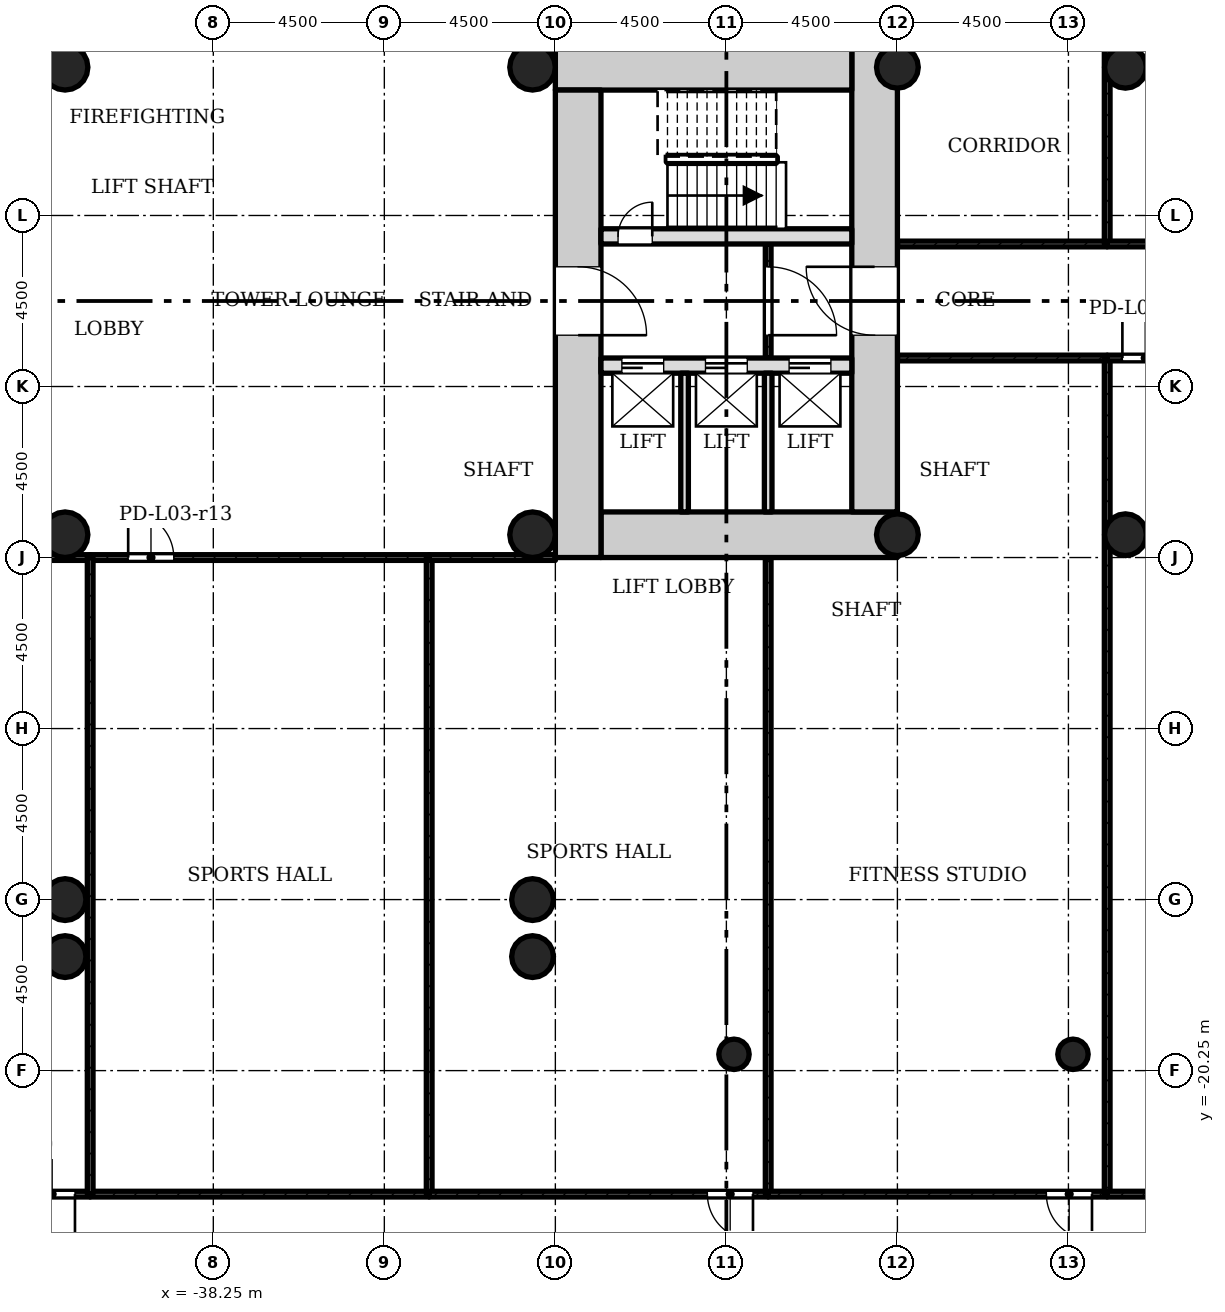
"""IFC4 building model, lengths in metres.
Left out: names, types, materials, properties, quantities, classifications, styles, units other than length and angle.
Written with IfcOpenShell. Run it as: python <this file> out.ifc"""

import sys

from ifc_helpers import new_model, si_unit, direction, frame, frame_2d, origin, origin_2d, place, context, subcontext, project, spatial, rectangle, hollow_circle, extrude, element, fill, save


model = new_model("IFC4")
c1 = context("Model", 3, precision=1e-05, world=origin(), true_north=direction((0.0, 1.0)))
c2 = subcontext(c1, "Body", "Model", "MODEL_VIEW")
j1 = project(units=[si_unit("LENGTHUNIT", "METRE"), si_unit("PLANEANGLEUNIT", "RADIAN")], contexts=[c1])
p1 = place(None, origin())
s1 = spatial("IfcSite", under=j1, at=p1, CompositionType="ELEMENT")
p2 = place(p1, origin())
s2 = spatial("IfcBuilding", under=s1, at=p2, CompositionType="ELEMENT")
p3 = place(p2, frame((0.0, 0.0, 15.5)))
s3 = spatial("IfcBuildingStorey", under=s2, at=p3, CompositionType="ELEMENT", Elevation=15.5)
p4 = place(p3, frame((-28.05, -6.15, 0.0), z_axis=(0.0, 0.0, 1.0), x_axis=(1.0, 0.0, 0.0)))
e1 = element("IfcWall", 1, at=p4, inside=s3, PredefinedType="SHEAR", context=c2, shape_type="SweptSolid", body=[
    extrude(rectangle(XDim=7.8, YDim=1.2, at=frame_2d((3.9, 0.0))), origin(), (0.0, 0.0, 1.0), 4.5),
])
p5 = place(p3, frame((-20.85, -5.55, 0.0), z_axis=(0.0, 0.0, 1.0), x_axis=(0.0, 1.0, 0.0)))
e2 = element("IfcWall", 2, at=p5, inside=s3, PredefinedType="SHEAR", context=c2, shape_type="SweptSolid", body=[
    extrude(rectangle(XDim=12.3, YDim=1.2, at=frame_2d((6.15, 0.0))), origin(), (0.0, 0.0, 1.0), 4.5),
])
p6 = place(p5, frame((4.65, 0.0, 0.0)))
e3 = element("IfcOpeningElement", 3, at=p6, cuts=e2, PredefinedType="OPENING", context=c2, shape_type="SweptSolid", body=[
    extrude(rectangle(XDim=1.8, YDim=2.1, at=frame_2d((0.9, 1.05))), frame((0.0, 0.61, 0.0), z_axis=(0.0, -1.0, 0.0), x_axis=(1.0, 0.0, 0.0)), (0.0, 0.0, 1.0), 1.22),
])
p7 = place(p3, frame((-21.45, 6.15, 0.0), z_axis=(0.0, 0.0, 1.0), x_axis=(-1.0, 0.0, 0.0)))
e4 = element("IfcWall", 4, at=p7, inside=s3, PredefinedType="SHEAR", context=c2, shape_type="SweptSolid", body=[
    extrude(rectangle(XDim=7.8, YDim=1.2, at=frame_2d((3.9, 0.0))), origin(), (0.0, 0.0, 1.0), 4.5),
])
p8 = place(p3, frame((-28.65, 5.55, 0.0), z_axis=(0.0, 0.0, 1.0), x_axis=(0.0, -1.0, 0.0)))
e5 = element("IfcWall", 5, at=p8, inside=s3, PredefinedType="SHEAR", context=c2, shape_type="SweptSolid", body=[
    extrude(rectangle(XDim=12.3, YDim=1.2, at=frame_2d((6.15, 0.0))), origin(), (0.0, 0.0, 1.0), 4.5),
])
p9 = place(p8, frame((4.65, 0.0, 0.0)))
e6 = element("IfcOpeningElement", 6, at=p9, cuts=e5, PredefinedType="OPENING", context=c2, shape_type="SweptSolid", body=[
    extrude(rectangle(XDim=1.8, YDim=2.1, at=frame_2d((0.9, 1.05))), frame((0.0, 0.61, 0.0), z_axis=(0.0, -1.0, 0.0), x_axis=(1.0, 0.0, 0.0)), (0.0, 0.0, 1.0), 1.22),
])
p10 = place(p3, frame((-28.05, -1.7, 0.0), z_axis=(0.0, 0.0, 1.0), x_axis=(1.0, 0.0, 0.0)))
e7 = element("IfcWall", 7, at=p10, inside=s3, PredefinedType="SHEAR", context=c2, shape_type="SweptSolid", body=[
    extrude(rectangle(XDim=6.6, YDim=0.4, at=frame_2d((3.3, 0.0))), origin(), (0.0, 0.0, 1.0), 4.5),
])
p11 = place(p10, frame((0.55, 0.0, 0.0)))
e8 = element("IfcOpeningElement", 8, at=p11, cuts=e7, PredefinedType="OPENING", context=c2, shape_type="SweptSolid", body=[
    extrude(rectangle(XDim=1.1, YDim=2.1, at=frame_2d((0.55, 1.05))), frame((0.0, 0.21, 0.0), z_axis=(0.0, -1.0, 0.0), x_axis=(1.0, 0.0, 0.0)), (0.0, 0.0, 1.0), 0.42),
])
p12 = place(p10, frame((2.75, 0.0, 0.0)))
e9 = element("IfcOpeningElement", 9, at=p12, cuts=e7, PredefinedType="OPENING", context=c2, shape_type="SweptSolid", body=[
    extrude(rectangle(XDim=1.1, YDim=2.1, at=frame_2d((0.55, 1.05))), frame((0.0, 0.21, 0.0), z_axis=(0.0, -1.0, 0.0), x_axis=(1.0, 0.0, 0.0)), (0.0, 0.0, 1.0), 0.42),
])
p13 = place(p10, frame((4.95, 0.0, 0.0)))
e10 = element("IfcOpeningElement", 10, at=p13, cuts=e7, PredefinedType="OPENING", context=c2, shape_type="SweptSolid", body=[
    extrude(rectangle(XDim=1.1, YDim=2.1, at=frame_2d((0.55, 1.05))), frame((0.0, 0.21, 0.0), z_axis=(0.0, -1.0, 0.0), x_axis=(1.0, 0.0, 0.0)), (0.0, 0.0, 1.0), 0.42),
])
p14 = place(p3, frame((-28.05, 1.7, 0.0), z_axis=(0.0, 0.0, 1.0), x_axis=(1.0, 0.0, 0.0)))
e11 = element("IfcWall", 11, at=p14, inside=s3, PredefinedType="SHEAR", context=c2, shape_type="SweptSolid", body=[
    extrude(rectangle(XDim=6.6, YDim=0.4, at=frame_2d((3.3, 0.0))), origin(), (0.0, 0.0, 1.0), 4.5),
])
p15 = place(p14, frame((0.45, 0.0, 0.0)))
e12 = element("IfcOpeningElement", 12, at=p15, cuts=e11, PredefinedType="OPENING", context=c2, shape_type="SweptSolid", body=[
    extrude(rectangle(XDim=0.9, YDim=2.1, at=frame_2d((0.45, 1.05))), frame((0.0, 0.21, 0.0), z_axis=(0.0, -1.0, 0.0), x_axis=(1.0, 0.0, 0.0)), (0.0, 0.0, 1.0), 0.42),
])
for number, where, z_axis, x_axis in (
    (13, (-20.25, -6.15, 0.0), (0.0, 0.0, 1.0), (1.0, 0.0, 0.0)),
    (14, (-20.25, 6.15, 0.0), (0.0, 0.0, 1.0), (1.0, 0.0, 0.0)),
    (15, (-14.25, -6.15, 0.0), (0.0, 0.0, 1.0), (1.0, 0.0, 0.0)),
    (16, (-14.25, 6.15, 0.0), (0.0, 0.0, 1.0), (1.0, 0.0, 0.0)),
    (17, (-42.15, -15.75, 0.0), (0.0, 0.0, 1.0), (1.0, 0.0, 0.0)),
    (18, (-29.85, -15.75, 0.0), (0.0, 0.0, 1.0), (1.0, 0.0, 0.0)),
    (19, (-42.15, -17.25, 0.0), (0.0, 0.0, 1.0), (1.0, 0.0, 0.0)),
    (20, (-29.85, -17.25, 0.0), (0.0, 0.0, 1.0), (1.0, 0.0, 0.0)),
):
    element("IfcColumn", number, at=place(p3, frame(where, z_axis=z_axis, x_axis=x_axis)), inside=s3, PredefinedType="COLUMN", context=c2, shape_type="SweptSolid", body=[
        extrude(hollow_circle(Radius=0.55, WallThickness=0.04, at=origin_2d()), origin(), (0.0, 0.0, 1.0), 4.5),
    ])
for number, where, z_axis, x_axis in (
    (21, (-42.15, -6.15, 0.0), (0.0, 0.0, 1.0), (1.0, 0.0, 0.0)),
    (22, (-29.85, -6.15, 0.0), (0.0, 0.0, 1.0), (1.0, 0.0, 0.0)),
    (23, (-29.85, 6.15, 0.0), (0.0, 0.0, 1.0), (1.0, 0.0, 0.0)),
    (24, (-42.15, 6.15, 0.0), (0.0, 0.0, 1.0), (1.0, 0.0, 0.0)),
):
    element("IfcColumn", number, at=place(p3, frame(where, z_axis=z_axis, x_axis=x_axis)), inside=s3, PredefinedType="COLUMN", context=c2, shape_type="SweptSolid", body=[
        extrude(hollow_circle(Radius=0.6, WallThickness=0.045, at=origin_2d()), origin(), (0.0, 0.0, 1.0), 4.5),
    ])
for number, where, z_axis, x_axis in (
    (25, (-24.55, -19.821, 0.0), (0.0, 0.0, 1.0), (1.0, 0.0, 0.0)),
    (26, (-15.63, -19.821, 0.0), (0.0, 0.0, 1.0), (1.0, 0.0, 0.0)),
):
    element("IfcColumn", number, at=place(p3, frame(where, z_axis=z_axis, x_axis=x_axis)), inside=s3, PredefinedType="COLUMN", context=c2, shape_type="SweptSolid", body=[
        extrude(hollow_circle(Radius=0.4, WallThickness=0.028, at=origin_2d()), origin(), (0.0, 0.0, 1.0), 4.5),
    ])
p16 = place(p3, frame((-23.65, -1.5, 0.0), z_axis=(0.0, 0.0, 1.0), x_axis=(0.0, 1.0, 0.0)))
e27 = element("IfcWall", 27, at=p16, inside=s3, PredefinedType="PARTITIONING", context=c2, shape_type="SweptSolid", body=[
    extrude(rectangle(XDim=3.0, YDim=0.15, at=frame_2d((1.5, 0.0))), origin(), (0.0, 0.0, 1.0), 4.08),
])
p17 = place(p16, frame((0.6, 0.0, 0.0)))
e28 = element("IfcOpeningElement", 28, at=p17, cuts=e27, PredefinedType="OPENING", context=c2, shape_type="SweptSolid", body=[
    extrude(rectangle(XDim=1.8, YDim=2.1, at=frame_2d((0.9, 1.05))), frame((0.0, 0.085, 0.0), z_axis=(0.0, -1.0, 0.0), x_axis=(1.0, 0.0, 0.0)), (0.0, 0.0, 1.0), 0.17),
])
for number, where, z_axis, x_axis in (
    (29, (-25.85, -5.55, 0.0), (0.0, 0.0, 1.0), (0.0, 1.0, 0.0)),
    (30, (-23.65, -5.55, 0.0), (0.0, 0.0, 1.0), (0.0, 1.0, 0.0)),
):
    element("IfcWall", number, at=place(p3, frame(where, z_axis=z_axis, x_axis=x_axis)), inside=s3, PredefinedType="SOLIDWALL", context=c2, shape_type="SweptSolid", body=[
        extrude(rectangle(XDim=3.65, YDim=0.2, at=frame_2d((1.825, 0.0))), origin(), (0.0, 0.0, 1.0), 4.08),
    ])
p18 = place(p3, frame((-42.75, -6.75, 0.0), z_axis=(0.0, 0.0, 1.0), x_axis=(1.0, 0.0, 0.0)))
e31 = element("IfcWall", 31, at=p18, inside=s3, PredefinedType="PARTITIONING", context=c2, shape_type="SweptSolid", body=[
    extrude(rectangle(XDim=1.26, YDim=0.15, at=frame_2d((0.63, 0.0))), origin(), (0.0, 0.0, 1.0), 4.08),
])
p19 = place(p3, frame((-41.49, -23.5, 0.0), z_axis=(0.0, 0.0, 1.0), x_axis=(-1.0, 0.0, 0.0)))
e32 = element("IfcWall", 32, at=p19, inside=s3, PredefinedType="PARTITIONING", context=c2, shape_type="SweptSolid", body=[
    extrude(rectangle(XDim=8.92, YDim=0.15, at=frame_2d((4.46, 0.0))), origin(), (0.0, 0.0, 1.0), 4.08),
])
p20 = place(p19, frame((0.4, 0.0, 0.0)))
e33 = element("IfcOpeningElement", 33, at=p20, cuts=e32, PredefinedType="OPENING", context=c2, shape_type="SweptSolid", body=[
    extrude(rectangle(XDim=1.2, YDim=2.1, at=frame_2d((0.6, 1.05))), frame((0.0, 0.085, 0.0), z_axis=(0.0, -1.0, 0.0), x_axis=(1.0, 0.0, 0.0)), (0.0, 0.0, 1.0), 0.17),
])
p21 = place(p3, frame((-41.49, -6.75, 0.0), z_axis=(0.0, 0.0, 1.0), x_axis=(1.0, 0.0, 0.0)))
e34 = element("IfcWall", 34, at=p21, inside=s3, PredefinedType="PARTITIONING", context=c2, shape_type="SweptSolid", body=[
    extrude(rectangle(XDim=8.92, YDim=0.15, at=frame_2d((4.46, 0.0))), origin(), (0.0, 0.0, 1.0), 4.08),
])
p22 = place(p21, frame((1.0, 0.0, 0.0)))
e35 = element("IfcOpeningElement", 35, at=p22, cuts=e34, PredefinedType="OPENING", context=c2, shape_type="SweptSolid", body=[
    extrude(rectangle(XDim=1.2, YDim=2.1, at=frame_2d((0.6, 1.05))), frame((0.0, 0.085, 0.0), z_axis=(0.0, -1.0, 0.0), x_axis=(1.0, 0.0, 0.0)), (0.0, 0.0, 1.0), 0.17),
])
p23 = place(p3, frame((-32.57, -23.5, 0.0), z_axis=(0.0, 0.0, 1.0), x_axis=(-1.0, 0.0, 0.0)))
e36 = element("IfcWall", 36, at=p23, inside=s3, PredefinedType="PARTITIONING", context=c2, shape_type="SweptSolid", body=[
    extrude(rectangle(XDim=8.92, YDim=0.15, at=frame_2d((4.46, 0.0))), origin(), (0.0, 0.0, 1.0), 4.08),
])
for number, where, z_axis, x_axis in (
    (37, (-41.49, -23.5, 0.0), (0.0, 0.0, 1.0), (0.0, 1.0, 0.0)),
    (38, (-32.57, -6.75, 0.0), (0.0, 0.0, 1.0), (0.0, -1.0, 0.0)),
):
    element("IfcWall", number, at=place(p3, frame(where, z_axis=z_axis, x_axis=x_axis)), inside=s3, PredefinedType="PARTITIONING", context=c2, shape_type="SweptSolid", body=[
        extrude(rectangle(XDim=16.75, YDim=0.15, at=frame_2d((8.375, 0.0))), origin(), (0.0, 0.0, 1.0), 4.08),
    ])
p24 = place(p3, frame((-32.57, -6.75, 0.0), z_axis=(0.0, 0.0, 1.0), x_axis=(1.0, 0.0, 0.0)))
e39 = element("IfcWall", 39, at=p24, inside=s3, PredefinedType="PARTITIONING", context=c2, shape_type="SweptSolid", body=[
    extrude(rectangle(XDim=3.32, YDim=0.15, at=frame_2d((1.66, 0.0))), origin(), (0.0, 0.0, 1.0), 4.08),
])
p25 = place(p3, frame((-23.65, -23.5, 0.0), z_axis=(0.0, 0.0, 1.0), x_axis=(-1.0, 0.0, 0.0)))
e40 = element("IfcWall", 40, at=p25, inside=s3, PredefinedType="PARTITIONING", context=c2, shape_type="SweptSolid", body=[
    extrude(rectangle(XDim=8.92, YDim=0.15, at=frame_2d((4.46, 0.0))), origin(), (0.0, 0.0, 1.0), 4.08),
])
p26 = place(p25, frame((0.4, 0.0, 0.0)))
e41 = element("IfcOpeningElement", 41, at=p26, cuts=e40, PredefinedType="OPENING", context=c2, shape_type="SweptSolid", body=[
    extrude(rectangle(XDim=1.2, YDim=2.1, at=frame_2d((0.6, 1.05))), frame((0.0, 0.085, 0.0), z_axis=(0.0, -1.0, 0.0), x_axis=(1.0, 0.0, 0.0)), (0.0, 0.0, 1.0), 0.17),
])
p27 = place(p3, frame((-23.65, -6.75, 0.0), z_axis=(0.0, 0.0, 1.0), x_axis=(0.0, -1.0, 0.0)))
e42 = element("IfcWall", 42, at=p27, inside=s3, PredefinedType="PARTITIONING", context=c2, shape_type="SweptSolid", body=[
    extrude(rectangle(XDim=16.75, YDim=0.15, at=frame_2d((8.375, 0.0))), origin(), (0.0, 0.0, 1.0), 4.08),
])
p28 = place(p3, frame((-20.25, -1.5, 0.0), z_axis=(0.0, 0.0, 1.0), x_axis=(1.0, 0.0, 0.0)))
e43 = element("IfcWall", 43, at=p28, inside=s3, PredefinedType="PARTITIONING", context=c2, shape_type="SweptSolid", body=[
    extrude(rectangle(XDim=5.52, YDim=0.15, at=frame_2d((2.76, 0.0))), origin(), (0.0, 0.0, 1.0), 4.08),
])
p29 = place(p3, frame((-14.73, -23.5, 0.0), z_axis=(0.0, 0.0, 1.0), x_axis=(-1.0, 0.0, 0.0)))
e44 = element("IfcWall", 44, at=p29, inside=s3, PredefinedType="PARTITIONING", context=c2, shape_type="SweptSolid", body=[
    extrude(rectangle(XDim=8.92, YDim=0.15, at=frame_2d((4.46, 0.0))), origin(), (0.0, 0.0, 1.0), 4.08),
])
p30 = place(p29, frame((0.4, 0.0, 0.0)))
e45 = element("IfcOpeningElement", 45, at=p30, cuts=e44, PredefinedType="OPENING", context=c2, shape_type="SweptSolid", body=[
    extrude(rectangle(XDim=1.2, YDim=2.1, at=frame_2d((0.6, 1.05))), frame((0.0, 0.085, 0.0), z_axis=(0.0, -1.0, 0.0), x_axis=(1.0, 0.0, 0.0)), (0.0, 0.0, 1.0), 0.17),
])
p31 = place(p3, frame((-14.73, -1.5, 0.0), z_axis=(0.0, 0.0, 1.0), x_axis=(0.0, -1.0, 0.0)))
e46 = element("IfcWall", 46, at=p31, inside=s3, PredefinedType="PARTITIONING", context=c2, shape_type="SweptSolid", body=[
    extrude(rectangle(XDim=22.0, YDim=0.15, at=frame_2d((11.0, 0.0))), origin(), (0.0, 0.0, 1.0), 4.08),
])
p32 = place(p3, frame((-14.73, 1.5, 0.0), z_axis=(0.0, 0.0, 1.0), x_axis=(-1.0, 0.0, 0.0)))
e47 = element("IfcWall", 47, at=p32, inside=s3, PredefinedType="PARTITIONING", context=c2, shape_type="SweptSolid", body=[
    extrude(rectangle(XDim=5.52, YDim=0.15, at=frame_2d((2.76, 0.0))), origin(), (0.0, 0.0, 1.0), 4.08),
])
p33 = place(p3, frame((-14.73, 26.5, 0.0), z_axis=(0.0, 0.0, 1.0), x_axis=(0.0, -1.0, 0.0)))
e48 = element("IfcWall", 48, at=p33, inside=s3, PredefinedType="PARTITIONING", context=c2, shape_type="SweptSolid", body=[
    extrude(rectangle(XDim=25.0, YDim=0.15, at=frame_2d((12.5, 0.0))), origin(), (0.0, 0.0, 1.0), 4.08),
])
p34 = place(p3, frame((-14.73, -1.5, 0.0), z_axis=(0.0, 0.0, 1.0), x_axis=(1.0, 0.0, 0.0)))
e49 = element("IfcWall", 49, at=p34, inside=s3, PredefinedType="PARTITIONING", context=c2, shape_type="SweptSolid", body=[
    extrude(rectangle(XDim=8.92, YDim=0.15, at=frame_2d((4.46, 0.0))), origin(), (0.0, 0.0, 1.0), 4.08),
])
p35 = place(p34, frame((0.4, 0.0, 0.0)))
e50 = element("IfcOpeningElement", 50, at=p35, cuts=e49, PredefinedType="OPENING", context=c2, shape_type="SweptSolid", body=[
    extrude(rectangle(XDim=1.2, YDim=2.1, at=frame_2d((0.6, 1.05))), frame((0.0, 0.085, 0.0), z_axis=(0.0, -1.0, 0.0), x_axis=(1.0, 0.0, 0.0)), (0.0, 0.0, 1.0), 0.17),
])
for number, where, z_axis, x_axis in (
    (51, (-5.81, -23.5, 0.0), (0.0, 0.0, 1.0), (-1.0, 0.0, 0.0)),
    (52, (-5.81, 1.5, 0.0), (0.0, 0.0, 1.0), (-1.0, 0.0, 0.0)),
):
    element("IfcWall", number, at=place(p3, frame(where, z_axis=z_axis, x_axis=x_axis)), inside=s3, PredefinedType="PARTITIONING", context=c2, shape_type="SweptSolid", body=[
        extrude(rectangle(XDim=8.92, YDim=0.15, at=frame_2d((4.46, 0.0))), origin(), (0.0, 0.0, 1.0), 4.08),
    ])
p36 = place(p17, origin())
e53 = element("IfcDoor", 53, at=p36, inside=s3, OperationType="SINGLE_SWING_LEFT", PredefinedType="DOOR", context=c2, shape_type="SweptSolid", body=[
    extrude(rectangle(XDim=1.8, YDim=2.1, at=frame_2d((0.9, 1.05))), frame((0.0, 0.025, 0.0), z_axis=(0.0, -1.0, 0.0), x_axis=(1.0, 0.0, 0.0)), (0.0, 0.0, 1.0), 0.05),
])
fill(e28, e53)
p37 = place(p20, origin())
e54 = element("IfcDoor", 54, at=p37, inside=s3, OperationType="SINGLE_SWING_RIGHT", PredefinedType="DOOR", context=c2, shape_type="SweptSolid", body=[
    extrude(rectangle(XDim=1.2, YDim=2.1, at=frame_2d((0.6, 1.05))), frame((0.0, 0.025, 0.0), z_axis=(0.0, -1.0, 0.0), x_axis=(1.0, 0.0, 0.0)), (0.0, 0.0, 1.0), 0.05),
])
fill(e33, e54)
p38 = place(p22, origin())
e55 = element("IfcDoor", 55, at=p38, inside=s3, OperationType="SINGLE_SWING_RIGHT", PredefinedType="DOOR", context=c2, shape_type="SweptSolid", body=[
    extrude(rectangle(XDim=1.2, YDim=2.1, at=frame_2d((0.6, 1.05))), frame((0.0, 0.025, 0.0), z_axis=(0.0, -1.0, 0.0), x_axis=(1.0, 0.0, 0.0)), (0.0, 0.0, 1.0), 0.05),
])
fill(e35, e55)
p39 = place(p26, origin())
e56 = element("IfcDoor", 56, at=p39, inside=s3, OperationType="SINGLE_SWING_RIGHT", PredefinedType="DOOR", context=c2, shape_type="SweptSolid", body=[
    extrude(rectangle(XDim=1.2, YDim=2.1, at=frame_2d((0.6, 1.05))), frame((0.0, 0.025, 0.0), z_axis=(0.0, -1.0, 0.0), x_axis=(1.0, 0.0, 0.0)), (0.0, 0.0, 1.0), 0.05),
])
fill(e41, e56)
p40 = place(p30, origin())
e57 = element("IfcDoor", 57, at=p40, inside=s3, OperationType="SINGLE_SWING_RIGHT", PredefinedType="DOOR", context=c2, shape_type="SweptSolid", body=[
    extrude(rectangle(XDim=1.2, YDim=2.1, at=frame_2d((0.6, 1.05))), frame((0.0, 0.025, 0.0), z_axis=(0.0, -1.0, 0.0), x_axis=(1.0, 0.0, 0.0)), (0.0, 0.0, 1.0), 0.05),
])
fill(e45, e57)
p41 = place(p35, origin())
e58 = element("IfcDoor", 58, at=p41, inside=s3, OperationType="SINGLE_SWING_RIGHT", PredefinedType="DOOR", context=c2, shape_type="SweptSolid", body=[
    extrude(rectangle(XDim=1.2, YDim=2.1, at=frame_2d((0.6, 1.05))), frame((0.0, 0.025, 0.0), z_axis=(0.0, -1.0, 0.0), x_axis=(1.0, 0.0, 0.0)), (0.0, 0.0, 1.0), 0.05),
])
fill(e50, e58)
p42 = place(p15, origin())
e59 = element("IfcDoor", 59, at=p42, inside=s3, OperationType="SINGLE_SWING_LEFT", PredefinedType="DOOR", context=c2, shape_type="SweptSolid", body=[
    extrude(rectangle(XDim=0.9, YDim=2.1, at=frame_2d((0.45, 1.05))), frame((0.0, 0.025, 0.0), z_axis=(0.0, -1.0, 0.0), x_axis=(1.0, 0.0, 0.0)), (0.0, 0.0, 1.0), 0.05),
])
fill(e12, e59)
p43 = place(p11, origin())
e60 = element("IfcDoor", 60, at=p43, inside=s3, OperationType="SLIDING_TO_LEFT", PredefinedType="DOOR", context=c2, shape_type="SweptSolid", body=[
    extrude(rectangle(XDim=1.1, YDim=2.1, at=frame_2d((0.55, 1.05))), frame((0.0, 0.025, 0.0), z_axis=(0.0, -1.0, 0.0), x_axis=(1.0, 0.0, 0.0)), (0.0, 0.0, 1.0), 0.05),
])
fill(e8, e60)
p44 = place(p12, origin())
e61 = element("IfcDoor", 61, at=p44, inside=s3, OperationType="SLIDING_TO_LEFT", PredefinedType="DOOR", context=c2, shape_type="SweptSolid", body=[
    extrude(rectangle(XDim=1.1, YDim=2.1, at=frame_2d((0.55, 1.05))), frame((0.0, 0.025, 0.0), z_axis=(0.0, -1.0, 0.0), x_axis=(1.0, 0.0, 0.0)), (0.0, 0.0, 1.0), 0.05),
])
fill(e9, e61)
p45 = place(p13, origin())
e62 = element("IfcDoor", 62, at=p45, inside=s3, OperationType="SLIDING_TO_LEFT", PredefinedType="DOOR", context=c2, shape_type="SweptSolid", body=[
    extrude(rectangle(XDim=1.1, YDim=2.1, at=frame_2d((0.55, 1.05))), frame((0.0, 0.025, 0.0), z_axis=(0.0, -1.0, 0.0), x_axis=(1.0, 0.0, 0.0)), (0.0, 0.0, 1.0), 0.05),
])
fill(e10, e62)
p46 = place(p9, origin())
e63 = element("IfcDoor", 63, at=p46, inside=s3, OperationType="SINGLE_SWING_LEFT", PredefinedType="DOOR", context=c2, shape_type="SweptSolid", body=[
    extrude(rectangle(XDim=1.8, YDim=2.1, at=frame_2d((0.9, 1.05))), frame((0.0, 0.025, 0.0), z_axis=(0.0, -1.0, 0.0), x_axis=(1.0, 0.0, 0.0)), (0.0, 0.0, 1.0), 0.05),
])
fill(e6, e63)
p47 = place(p6, origin())
e64 = element("IfcDoor", 64, at=p47, inside=s3, OperationType="SINGLE_SWING_LEFT", PredefinedType="DOOR", context=c2, shape_type="SweptSolid", body=[
    extrude(rectangle(XDim=1.8, YDim=2.1, at=frame_2d((0.9, 1.05))), frame((0.0, 0.025, 0.0), z_axis=(0.0, -1.0, 0.0), x_axis=(1.0, 0.0, 0.0)), (0.0, 0.0, 1.0), 0.05),
])
fill(e3, e64)
save(model, sys.argv[1])
